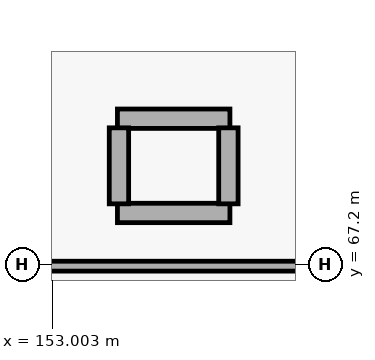
"""IFC4 building model, lengths in metres.
Left out: names, types, materials, properties, quantities, classifications, styles, units other than length and angle.
Written with IfcOpenShell. Run it as: python <this file> out.ifc"""

import sys

from ifc_helpers import new_model, si_unit, direction, frame, frame_2d, origin, place, context, subcontext, project, spatial, rectangle, extrude, element, save


model = new_model("IFC4")
c1 = context("Model", 3, precision=1e-05, world=origin(), true_north=direction((0.0, 1.0)))
c2 = subcontext(c1, "Body", "Model", "MODEL_VIEW")
j1 = project(units=[si_unit("LENGTHUNIT", "METRE"), si_unit("PLANEANGLEUNIT", "RADIAN")], contexts=[c1])
p1 = place(None, origin())
s1 = spatial("IfcSite", under=j1, at=p1, CompositionType="ELEMENT")
p2 = place(p1, origin())
s2 = spatial("IfcBuilding", under=s1, at=p2, CompositionType="ELEMENT")
p3 = place(p2, frame((0.0, 0.0, 26.4)))
s3 = spatial("IfcBuildingStorey", under=s2, at=p3, CompositionType="ELEMENT", Elevation=26.4)
for number, where, z_axis, x_axis in (
    (1, (153.86, 69.12, 0.0), (0.0, 0.0, 1.0), (1.0, 0.0, 0.0)),
    (2, (153.86, 67.88, 0.0), (0.0, 0.0, 1.0), (1.0, 0.0, 0.0)),
):
    element("IfcWall", number, at=place(p3, frame(where, z_axis=z_axis, x_axis=x_axis)), inside=s3, PredefinedType="PARTITIONING", context=c2, shape_type="SweptSolid", body=[
        extrude(rectangle(XDim=1.48, YDim=0.255, at=frame_2d((0.74, 0.0))), origin(), (0.0, 0.0, 1.0), 3.91),
    ])
p4 = place(p3, frame((153.88, 68.0, 0.0), z_axis=(0.0, 0.0, 1.0), x_axis=(0.0, 1.0, 0.0)))
e3 = element("IfcWall", 3, at=p4, inside=s3, PredefinedType="PARTITIONING", context=c2, shape_type="SweptSolid", body=[
    extrude(rectangle(XDim=1.0, YDim=0.255, at=frame_2d((0.5, 0.0))), origin(), (0.0, 0.0, 1.0), 4.2),
])
p5 = place(p3, frame((155.32, 68.0, 0.0), z_axis=(0.0, 0.0, 1.0), x_axis=(0.0, 1.0, 0.0)))
e4 = element("IfcWall", 4, at=p5, inside=s3, PredefinedType="PARTITIONING", context=c2, shape_type="SweptSolid", body=[
    extrude(rectangle(XDim=1.0, YDim=0.255, at=frame_2d((0.5, 0.0))), origin(), (0.0, 0.0, 1.0), 3.91),
])
p6 = place(p3, frame((142.43, 67.18, 0.0), z_axis=(0.0, 0.0, 1.0), x_axis=(1.0, 0.0, 0.0)))
e5 = element("IfcWall", 5, at=p6, inside=s3, PredefinedType="PARTITIONING", context=c2, shape_type="SweptSolid", body=[
    extrude(rectangle(XDim=23.14, YDim=0.13, at=frame_2d((11.57, 0.0))), origin(), (0.0, 0.0, 1.0), 3.73),
])
p7 = place(p6, frame((19.4, 0.0, 0.0)))
e6 = element("IfcOpeningElement", 6, at=p7, cuts=e5, PredefinedType="OPENING", context=c2, shape_type="SweptSolid", body=[
    extrude(rectangle(XDim=1.62, YDim=2.38, at=frame_2d((0.81, 1.19))), frame((0.0, 0.075, 0.0), z_axis=(0.0, -1.0, 0.0), x_axis=(1.0, 0.0, 0.0)), (0.0, 0.0, 1.0), 0.15),
])
save(model, sys.argv[1])
